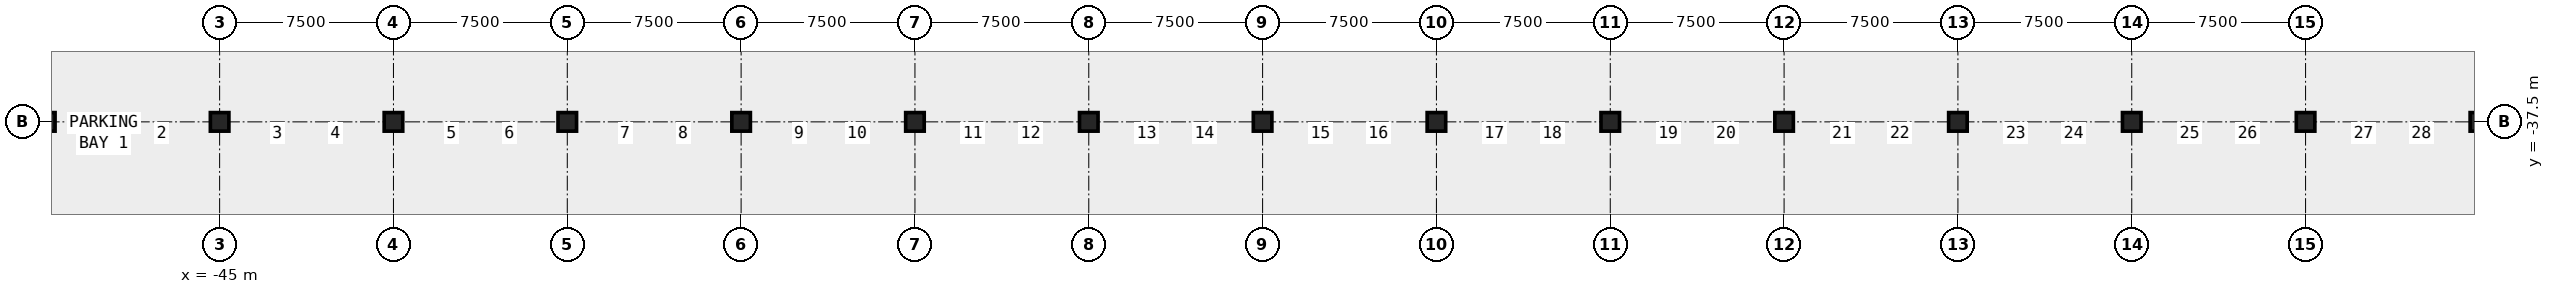
"""IFC4 building model, lengths in metres.
Left out: names, types, materials, properties, quantities, classifications, styles, units other than length and angle.
Written with IfcOpenShell. Run it as: python <this file> out.ifc"""

import sys

from ifc_helpers import new_model, si_unit, direction, frame, origin, origin_2d, place, context, subcontext, project, spatial, rectangle, extrude, element, save


model = new_model("IFC4")
c1 = context("Model", 3, precision=1e-05, world=origin(), true_north=direction((0.0, 1.0)))
c2 = subcontext(c1, "Body", "Model", "MODEL_VIEW")
j1 = project(units=[si_unit("LENGTHUNIT", "METRE"), si_unit("PLANEANGLEUNIT", "RADIAN")], contexts=[c1])
p1 = place(None, origin())
s1 = spatial("IfcSite", under=j1, at=p1, CompositionType="ELEMENT")
p2 = place(p1, origin())
s2 = spatial("IfcBuilding", under=s1, at=p2, CompositionType="ELEMENT")
p3 = place(p2, frame((0.0, 0.0, -11.0)))
s3 = spatial("IfcBuildingStorey", under=s2, at=p3, CompositionType="ELEMENT", Elevation=-11.0)
for number, where, z_axis, x_axis in (
    (1, (-52.5, -37.5, -0.42), (0.0, 0.0, 1.0), (1.0, 0.0, 0.0)),
    (2, (-45.0, -37.5, -0.42), (0.0, 0.0, 1.0), (1.0, 0.0, 0.0)),
    (3, (-37.5, -37.5, -0.42), (0.0, 0.0, 1.0), (1.0, 0.0, 0.0)),
    (4, (-30.0, -37.5, -0.42), (0.0, 0.0, 1.0), (1.0, 0.0, 0.0)),
    (5, (-22.5, -37.5, -0.42), (0.0, 0.0, 1.0), (1.0, 0.0, 0.0)),
    (6, (-15.0, -37.5, -0.42), (0.0, 0.0, 1.0), (1.0, 0.0, 0.0)),
    (7, (-7.5, -37.5, -0.42), (0.0, 0.0, 1.0), (1.0, 0.0, 0.0)),
    (8, (0.0, -37.5, -0.42), (0.0, 0.0, 1.0), (1.0, 0.0, 0.0)),
    (9, (7.5, -37.5, -0.42), (0.0, 0.0, 1.0), (1.0, 0.0, 0.0)),
    (10, (15.0, -37.5, -0.42), (0.0, 0.0, 1.0), (1.0, 0.0, 0.0)),
    (11, (22.5, -37.5, -0.42), (0.0, 0.0, 1.0), (1.0, 0.0, 0.0)),
    (12, (30.0, -37.5, -0.42), (0.0, 0.0, 1.0), (1.0, 0.0, 0.0)),
    (13, (37.5, -37.5, -0.42), (0.0, 0.0, 1.0), (1.0, 0.0, 0.0)),
    (14, (45.0, -37.5, -0.42), (0.0, 0.0, 1.0), (1.0, 0.0, 0.0)),
    (15, (52.5, -37.5, -0.42), (0.0, 0.0, 1.0), (1.0, 0.0, 0.0)),
):
    element("IfcColumn", number, at=place(p3, frame(where, z_axis=z_axis, x_axis=x_axis)), inside=s3, PredefinedType="COLUMN", context=c2, shape_type="SweptSolid", body=[
        extrude(rectangle(XDim=0.8, YDim=0.8, at=origin_2d()), origin(), (0.0, 0.0, 1.0), 5.5),
    ])
save(model, sys.argv[1])
